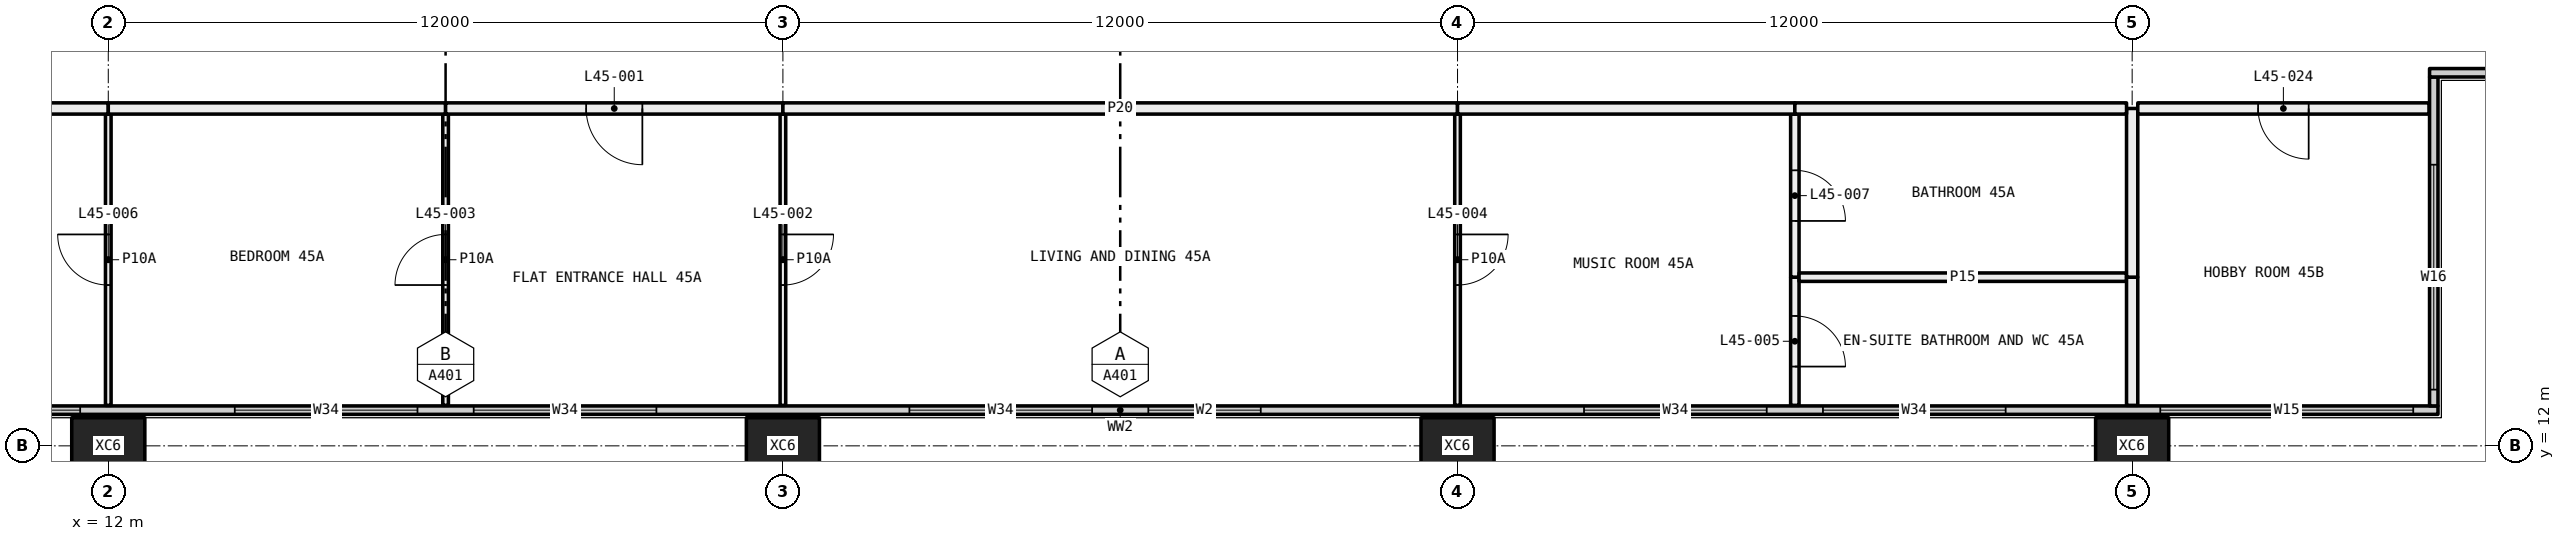
"""IFC4 building model, lengths in metres.
Left out: names, types, materials, properties, quantities, classifications, styles, units other than length and angle.
Written with IfcOpenShell. Run it as: python <this file> out.ifc"""

import sys

from ifc_helpers import new_model, si_unit, direction, frame, frame_2d, origin, origin_2d, place, context, subcontext, project, spatial, rectangle, hollow_rectangle, extrude, element, fill, save


model = new_model("IFC4")
c1 = context("Model", 3, precision=1e-05, world=origin(), true_north=direction((0.0, 1.0)))
c2 = subcontext(c1, "Body", "Model", "MODEL_VIEW")
j1 = project(units=[si_unit("LENGTHUNIT", "METRE"), si_unit("PLANEANGLEUNIT", "RADIAN")], contexts=[c1])
p1 = place(None, origin())
s1 = spatial("IfcSite", under=j1, at=p1, CompositionType="ELEMENT")
p2 = place(p1, origin())
s2 = spatial("IfcBuilding", under=s1, at=p2, CompositionType="ELEMENT")
p3 = place(p2, frame((0.0, 0.0, 172.05)))
s3 = spatial("IfcBuildingStorey", under=s2, at=p3, CompositionType="ELEMENT", Elevation=172.05)
for number, where, z_axis, x_axis in (
    (1, (12.0, 12.0, -0.4), (0.0, 0.0, 1.0), (1.0, 0.0, 0.0)),
    (2, (24.0, 12.0, -0.4), (0.0, 0.0, 1.0), (1.0, 0.0, 0.0)),
    (3, (36.0, 12.0, -0.4), (0.0, 0.0, 1.0), (1.0, 0.0, 0.0)),
    (4, (48.0, 12.0, -0.4), (0.0, 0.0, 1.0), (1.0, 0.0, 0.0)),
):
    element("IfcColumn", number, at=place(p3, frame(where, z_axis=z_axis, x_axis=x_axis)), inside=s3, PredefinedType="COLUMN", context=c2, shape_type="SweptSolid", body=[
        extrude(hollow_rectangle(XDim=1.3, YDim=1.0, WallThickness=0.05, at=origin_2d()), origin(), (0.0, 0.0, 1.0), 3.45),
    ])
p4 = place(p3, frame((6.56, 12.635, 0.0), z_axis=(0.0, 0.0, 1.0), x_axis=(1.0, 0.0, 0.0)))
e5 = element("IfcWall", 5, at=p4, inside=s3, PredefinedType="ELEMENTEDWALL", context=c2, shape_type="SweptSolid", body=[
    extrude(rectangle(XDim=46.88, YDim=0.15, at=frame_2d((23.44, 0.0))), origin(), (0.0, 0.0, 1.0), 3.05),
])
p5 = place(p4, frame((0.44, 0.0, 0.45)))
e6 = element("IfcOpeningElement", 6, at=p5, cuts=e5, PredefinedType="OPENING", context=c2, shape_type="SweptSolid", body=[
    extrude(rectangle(XDim=4.5, YDim=2.55, at=frame_2d((2.25, 1.275))), frame((0.0, 0.085, 0.0), z_axis=(0.0, -1.0, 0.0), x_axis=(1.0, 0.0, 0.0)), (0.0, 0.0, 1.0), 0.17),
])
p6 = place(p4, frame((7.69, 0.0, 0.45)))
e7 = element("IfcOpeningElement", 7, at=p6, cuts=e5, PredefinedType="OPENING", context=c2, shape_type="SweptSolid", body=[
    extrude(rectangle(XDim=3.25, YDim=2.55, at=frame_2d((1.625, 1.275))), frame((0.0, 0.085, 0.0), z_axis=(0.0, -1.0, 0.0), x_axis=(1.0, 0.0, 0.0)), (0.0, 0.0, 1.0), 0.17),
])
p7 = place(p4, frame((11.94, 0.0, 0.45)))
e8 = element("IfcOpeningElement", 8, at=p7, cuts=e5, PredefinedType="OPENING", context=c2, shape_type="SweptSolid", body=[
    extrude(rectangle(XDim=3.25, YDim=2.55, at=frame_2d((1.625, 1.275))), frame((0.0, 0.085, 0.0), z_axis=(0.0, -1.0, 0.0), x_axis=(1.0, 0.0, 0.0)), (0.0, 0.0, 1.0), 0.17),
])
p8 = place(p4, frame((19.69, 0.0, 0.45)))
e9 = element("IfcOpeningElement", 9, at=p8, cuts=e5, PredefinedType="OPENING", context=c2, shape_type="SweptSolid", body=[
    extrude(rectangle(XDim=3.25, YDim=2.55, at=frame_2d((1.625, 1.275))), frame((0.0, 0.085, 0.0), z_axis=(0.0, -1.0, 0.0), x_axis=(1.0, 0.0, 0.0)), (0.0, 0.0, 1.0), 0.17),
])
p9 = place(p4, frame((23.94, 0.0, 0.45)))
e10 = element("IfcOpeningElement", 10, at=p9, cuts=e5, PredefinedType="OPENING", context=c2, shape_type="SweptSolid", body=[
    extrude(rectangle(XDim=2.0, YDim=2.55, at=frame_2d((1.0, 1.275))), frame((0.0, 0.085, 0.0), z_axis=(0.0, -1.0, 0.0), x_axis=(1.0, 0.0, 0.0)), (0.0, 0.0, 1.0), 0.17),
])
p10 = place(p4, frame((31.69, 0.0, 0.45)))
e11 = element("IfcOpeningElement", 11, at=p10, cuts=e5, PredefinedType="OPENING", context=c2, shape_type="SweptSolid", body=[
    extrude(rectangle(XDim=3.25, YDim=2.55, at=frame_2d((1.625, 1.275))), frame((0.0, 0.085, 0.0), z_axis=(0.0, -1.0, 0.0), x_axis=(1.0, 0.0, 0.0)), (0.0, 0.0, 1.0), 0.17),
])
p11 = place(p4, frame((35.94, 0.0, 0.45)))
e12 = element("IfcOpeningElement", 12, at=p11, cuts=e5, PredefinedType="OPENING", context=c2, shape_type="SweptSolid", body=[
    extrude(rectangle(XDim=3.25, YDim=2.55, at=frame_2d((1.625, 1.275))), frame((0.0, 0.085, 0.0), z_axis=(0.0, -1.0, 0.0), x_axis=(1.0, 0.0, 0.0)), (0.0, 0.0, 1.0), 0.17),
])
p12 = place(p4, frame((41.94, 0.0, 0.45)))
e13 = element("IfcOpeningElement", 13, at=p12, cuts=e5, PredefinedType="OPENING", context=c2, shape_type="SweptSolid", body=[
    extrude(rectangle(XDim=4.5, YDim=2.55, at=frame_2d((2.25, 1.275))), frame((0.0, 0.085, 0.0), z_axis=(0.0, -1.0, 0.0), x_axis=(1.0, 0.0, 0.0)), (0.0, 0.0, 1.0), 0.17),
])
p13 = place(p3, frame((53.365, 12.71, 0.0), z_axis=(0.0, 0.0, 1.0), x_axis=(0.0, 1.0, 0.0)))
e14 = element("IfcWall", 14, at=p13, inside=s3, PredefinedType="ELEMENTEDWALL", context=c2, shape_type="SweptSolid", body=[
    extrude(rectangle(XDim=5.85, YDim=0.15, at=frame_2d((2.925, 0.0))), origin(), (0.0, 0.0, 1.0), 3.05),
])
p14 = place(p13, frame((0.29, 0.0, 0.45)))
e15 = element("IfcOpeningElement", 15, at=p14, cuts=e14, PredefinedType="OPENING", context=c2, shape_type="SweptSolid", body=[
    extrude(rectangle(XDim=4.0, YDim=2.55, at=frame_2d((2.0, 1.275))), frame((0.0, 0.085, 0.0), z_axis=(0.0, -1.0, 0.0), x_axis=(1.0, 0.0, 0.0)), (0.0, 0.0, 1.0), 0.17),
])
p15 = place(p3, frame((53.29, 18.635, 0.0), z_axis=(0.0, 0.0, 1.0), x_axis=(1.0, 0.0, 0.0)))
e16 = element("IfcWall", 16, at=p15, inside=s3, PredefinedType="ELEMENTEDWALL", context=c2, shape_type="SweptSolid", body=[
    extrude(rectangle(XDim=6.15, YDim=0.15, at=frame_2d((3.075, 0.0))), origin(), (0.0, 0.0, 1.0), 3.05),
])
p16 = place(p15, frame((1.71, 0.0, 0.45)))
e17 = element("IfcOpeningElement", 17, at=p16, cuts=e16, PredefinedType="OPENING", context=c2, shape_type="SweptSolid", body=[
    extrude(rectangle(XDim=4.0, YDim=2.55, at=frame_2d((2.0, 1.275))), frame((0.0, 0.085, 0.0), z_axis=(0.0, -1.0, 0.0), x_axis=(1.0, 0.0, 0.0)), (0.0, 0.0, 1.0), 0.17),
])
p17 = place(p3, frame((12.0, 12.72, 0.0), z_axis=(0.0, 0.0, 1.0), x_axis=(0.0, 1.0, 0.0)))
e18 = element("IfcWall", 18, at=p17, inside=s3, PredefinedType="PARTITIONING", context=c2, shape_type="SweptSolid", body=[
    extrude(rectangle(XDim=5.18, YDim=0.1, at=frame_2d((2.59, 0.0))), origin(), (0.0, 0.0, 1.0), 3.05),
])
p18 = place(p17, frame((2.14, 0.0, 0.0)))
e19 = element("IfcOpeningElement", 19, at=p18, cuts=e18, PredefinedType="OPENING", context=c2, shape_type="SweptSolid", body=[
    extrude(rectangle(XDim=0.9, YDim=2.1, at=frame_2d((0.45, 1.05))), frame((0.0, 0.06, 0.0), z_axis=(0.0, -1.0, 0.0), x_axis=(1.0, 0.0, 0.0)), (0.0, 0.0, 1.0), 0.12),
])
p19 = place(p3, frame((12.0, 18.0, 0.0), z_axis=(0.0, 0.0, 1.0), x_axis=(-1.0, 0.0, 0.0)))
e20 = element("IfcWall", 20, at=p19, inside=s3, PredefinedType="PARTITIONING", context=c2, shape_type="SweptSolid", body=[
    extrude(rectangle(XDim=1.9, YDim=0.2, at=frame_2d((0.95, 0.0))), origin(), (0.0, 0.0, 1.0), 3.05),
])
p20 = place(p3, frame((18.0, 12.72, 0.0), z_axis=(0.0, 0.0, 1.0), x_axis=(0.0, 1.0, 0.0)))
e21 = element("IfcWall", 21, at=p20, inside=s3, PredefinedType="PARTITIONING", context=c2, shape_type="SweptSolid", body=[
    extrude(rectangle(XDim=5.18, YDim=0.1, at=frame_2d((2.59, 0.0))), origin(), (0.0, 0.0, 1.0), 3.05),
])
p21 = place(p20, frame((2.14, 0.0, 0.0)))
e22 = element("IfcOpeningElement", 22, at=p21, cuts=e21, PredefinedType="OPENING", context=c2, shape_type="SweptSolid", body=[
    extrude(rectangle(XDim=0.9, YDim=2.1, at=frame_2d((0.45, 1.05))), frame((0.0, 0.06, 0.0), z_axis=(0.0, -1.0, 0.0), x_axis=(1.0, 0.0, 0.0)), (0.0, 0.0, 1.0), 0.12),
])
p22 = place(p3, frame((18.0, 18.0, 0.0), z_axis=(0.0, 0.0, 1.0), x_axis=(-1.0, 0.0, 0.0)))
e23 = element("IfcWall", 23, at=p22, inside=s3, PredefinedType="PARTITIONING", context=c2, shape_type="SweptSolid", body=[
    extrude(rectangle(XDim=6.0, YDim=0.2, at=frame_2d((3.0, 0.0))), origin(), (0.0, 0.0, 1.0), 3.05),
])
p23 = place(p3, frame((24.0, 12.72, 0.0), z_axis=(0.0, 0.0, 1.0), x_axis=(0.0, 1.0, 0.0)))
e24 = element("IfcWall", 24, at=p23, inside=s3, PredefinedType="PARTITIONING", context=c2, shape_type="SweptSolid", body=[
    extrude(rectangle(XDim=5.18, YDim=0.1, at=frame_2d((2.59, 0.0))), origin(), (0.0, 0.0, 1.0), 3.05),
])
p24 = place(p23, frame((2.14, 0.0, 0.0)))
e25 = element("IfcOpeningElement", 25, at=p24, cuts=e24, PredefinedType="OPENING", context=c2, shape_type="SweptSolid", body=[
    extrude(rectangle(XDim=0.9, YDim=2.1, at=frame_2d((0.45, 1.05))), frame((0.0, 0.06, 0.0), z_axis=(0.0, -1.0, 0.0), x_axis=(1.0, 0.0, 0.0)), (0.0, 0.0, 1.0), 0.12),
])
p25 = place(p3, frame((24.0, 18.0, 0.0), z_axis=(0.0, 0.0, 1.0), x_axis=(-1.0, 0.0, 0.0)))
e26 = element("IfcWall", 26, at=p25, inside=s3, PredefinedType="PARTITIONING", context=c2, shape_type="SweptSolid", body=[
    extrude(rectangle(XDim=6.0, YDim=0.2, at=frame_2d((3.0, 0.0))), origin(), (0.0, 0.0, 1.0), 3.05),
])
p26 = place(p25, frame((2.5, 0.0, 0.0)))
e27 = element("IfcOpeningElement", 27, at=p26, cuts=e26, PredefinedType="OPENING", context=c2, shape_type="SweptSolid", body=[
    extrude(rectangle(XDim=1.0, YDim=2.1, at=frame_2d((0.5, 1.05))), frame((0.0, 0.11, 0.0), z_axis=(0.0, -1.0, 0.0), x_axis=(1.0, 0.0, 0.0)), (0.0, 0.0, 1.0), 0.22),
])
p27 = place(p3, frame((36.0, 12.72, 0.0), z_axis=(0.0, 0.0, 1.0), x_axis=(0.0, 1.0, 0.0)))
e28 = element("IfcWall", 28, at=p27, inside=s3, PredefinedType="PARTITIONING", context=c2, shape_type="SweptSolid", body=[
    extrude(rectangle(XDim=5.18, YDim=0.1, at=frame_2d((2.59, 0.0))), origin(), (0.0, 0.0, 1.0), 2.45),
])
p28 = place(p27, frame((2.14, 0.0, 0.0)))
e29 = element("IfcOpeningElement", 29, at=p28, cuts=e28, PredefinedType="OPENING", context=c2, shape_type="SweptSolid", body=[
    extrude(rectangle(XDim=0.9, YDim=2.1, at=frame_2d((0.45, 1.05))), frame((0.0, 0.06, 0.0), z_axis=(0.0, -1.0, 0.0), x_axis=(1.0, 0.0, 0.0)), (0.0, 0.0, 1.0), 0.12),
])
p29 = place(p3, frame((36.0, 18.0, 0.0), z_axis=(0.0, 0.0, 1.0), x_axis=(-1.0, 0.0, 0.0)))
e30 = element("IfcWall", 30, at=p29, inside=s3, PredefinedType="PARTITIONING", context=c2, shape_type="SweptSolid", body=[
    extrude(rectangle(XDim=12.0, YDim=0.2, at=frame_2d((6.0, 0.0))), origin(), (0.0, 0.0, 1.0), 2.45),
])
p30 = place(p3, frame((42.0, 12.72, 0.0), z_axis=(0.0, 0.0, 1.0), x_axis=(0.0, 1.0, 0.0)))
e31 = element("IfcWall", 31, at=p30, inside=s3, PredefinedType="PARTITIONING", context=c2, shape_type="SweptSolid", body=[
    extrude(rectangle(XDim=2.28, YDim=0.15, at=frame_2d((1.14, 0.0))), origin(), (0.0, 0.0, 1.0), 3.05),
])
p31 = place(p30, frame((0.69, 0.0, 0.0)))
e32 = element("IfcOpeningElement", 32, at=p31, cuts=e31, PredefinedType="OPENING", context=c2, shape_type="SweptSolid", body=[
    extrude(rectangle(XDim=0.9, YDim=2.1, at=frame_2d((0.45, 1.05))), frame((0.0, 0.085, 0.0), z_axis=(0.0, -1.0, 0.0), x_axis=(1.0, 0.0, 0.0)), (0.0, 0.0, 1.0), 0.17),
])
p32 = place(p3, frame((42.0, 15.0, 0.0), z_axis=(0.0, 0.0, 1.0), x_axis=(0.0, 1.0, 0.0)))
e33 = element("IfcWall", 33, at=p32, inside=s3, PredefinedType="PARTITIONING", context=c2, shape_type="SweptSolid", body=[
    extrude(rectangle(XDim=2.9, YDim=0.15, at=frame_2d((1.45, 0.0))), origin(), (0.0, 0.0, 1.0), 3.05),
])
p33 = place(p32, frame((1.0, 0.0, 0.0)))
e34 = element("IfcOpeningElement", 34, at=p33, cuts=e33, PredefinedType="OPENING", context=c2, shape_type="SweptSolid", body=[
    extrude(rectangle(XDim=0.9, YDim=2.1, at=frame_2d((0.45, 1.05))), frame((0.0, 0.085, 0.0), z_axis=(0.0, -1.0, 0.0), x_axis=(1.0, 0.0, 0.0)), (0.0, 0.0, 1.0), 0.17),
])
p34 = place(p3, frame((42.0, 18.0, 0.0), z_axis=(0.0, 0.0, 1.0), x_axis=(-1.0, 0.0, 0.0)))
e35 = element("IfcWall", 35, at=p34, inside=s3, PredefinedType="PARTITIONING", context=c2, shape_type="SweptSolid", body=[
    extrude(rectangle(XDim=6.0, YDim=0.2, at=frame_2d((3.0, 0.0))), origin(), (0.0, 0.0, 1.0), 2.45),
])
p35 = place(p3, frame((47.9, 15.0, 0.0), z_axis=(0.0, 0.0, 1.0), x_axis=(-1.0, 0.0, 0.0)))
e36 = element("IfcWall", 36, at=p35, inside=s3, PredefinedType="PARTITIONING", context=c2, shape_type="SweptSolid", body=[
    extrude(rectangle(XDim=5.825, YDim=0.15, at=frame_2d((2.913, 0.0))), origin(), (0.0, 0.0, 1.0), 3.05),
])
p36 = place(p3, frame((48.0, 12.72, 0.0), z_axis=(0.0, 0.0, 1.0), x_axis=(0.0, 1.0, 0.0)))
e37 = element("IfcWall", 37, at=p36, inside=s3, PredefinedType="PARTITIONING", context=c2, shape_type="SweptSolid", body=[
    extrude(rectangle(XDim=2.28, YDim=0.2, at=frame_2d((1.14, 0.0))), origin(), (0.0, 0.0, 1.0), 3.05),
])
p37 = place(p3, frame((48.0, 15.0, 0.0), z_axis=(0.0, 0.0, 1.0), x_axis=(0.0, 1.0, 0.0)))
e38 = element("IfcWall", 38, at=p37, inside=s3, PredefinedType="PARTITIONING", context=c2, shape_type="SweptSolid", body=[
    extrude(rectangle(XDim=3.0, YDim=0.2, at=frame_2d((1.5, 0.0))), origin(), (0.0, 0.0, 1.0), 3.05),
])
p38 = place(p3, frame((47.9, 18.0, 0.0), z_axis=(0.0, 0.0, 1.0), x_axis=(-1.0, 0.0, 0.0)))
e39 = element("IfcWall", 39, at=p38, inside=s3, PredefinedType="PARTITIONING", context=c2, shape_type="SweptSolid", body=[
    extrude(rectangle(XDim=5.9, YDim=0.2, at=frame_2d((2.95, 0.0))), origin(), (0.0, 0.0, 1.0), 3.05),
])
p39 = place(p3, frame((53.28, 18.0, 0.0), z_axis=(0.0, 0.0, 1.0), x_axis=(-1.0, 0.0, 0.0)))
e40 = element("IfcWall", 40, at=p39, inside=s3, PredefinedType="PARTITIONING", context=c2, shape_type="SweptSolid", body=[
    extrude(rectangle(XDim=5.18, YDim=0.2, at=frame_2d((2.59, 0.0))), origin(), (0.0, 0.0, 1.0), 3.05),
])
p40 = place(p39, frame((2.14, 0.0, 0.0)))
e41 = element("IfcOpeningElement", 41, at=p40, cuts=e40, PredefinedType="OPENING", context=c2, shape_type="SweptSolid", body=[
    extrude(rectangle(XDim=0.9, YDim=2.1, at=frame_2d((0.45, 1.05))), frame((0.0, 0.11, 0.0), z_axis=(0.0, -1.0, 0.0), x_axis=(1.0, 0.0, 0.0)), (0.0, 0.0, 1.0), 0.22),
])
p41 = place(p5, origin())
e42 = element("IfcWindow", 42, at=p41, inside=s3, PartitioningType="SINGLE_PANEL", PredefinedType="WINDOW", context=c2, shape_type="SweptSolid", body=[
    extrude(rectangle(XDim=4.5, YDim=2.55, at=frame_2d((2.25, 1.275))), frame((0.0, 0.03, 0.0), z_axis=(0.0, -1.0, 0.0), x_axis=(1.0, 0.0, 0.0)), (0.0, 0.0, 1.0), 0.06),
])
fill(e6, e42)
p42 = place(p6, origin())
e43 = element("IfcWindow", 43, at=p42, inside=s3, PartitioningType="SINGLE_PANEL", PredefinedType="WINDOW", context=c2, shape_type="SweptSolid", body=[
    extrude(rectangle(XDim=3.25, YDim=2.55, at=frame_2d((1.625, 1.275))), frame((0.0, 0.03, 0.0), z_axis=(0.0, -1.0, 0.0), x_axis=(1.0, 0.0, 0.0)), (0.0, 0.0, 1.0), 0.06),
])
fill(e7, e43)
p43 = place(p7, origin())
e44 = element("IfcWindow", 44, at=p43, inside=s3, PartitioningType="SINGLE_PANEL", PredefinedType="WINDOW", context=c2, shape_type="SweptSolid", body=[
    extrude(rectangle(XDim=3.25, YDim=2.55, at=frame_2d((1.625, 1.275))), frame((0.0, 0.03, 0.0), z_axis=(0.0, -1.0, 0.0), x_axis=(1.0, 0.0, 0.0)), (0.0, 0.0, 1.0), 0.06),
])
fill(e8, e44)
p44 = place(p8, origin())
e45 = element("IfcWindow", 45, at=p44, inside=s3, PartitioningType="SINGLE_PANEL", PredefinedType="WINDOW", context=c2, shape_type="SweptSolid", body=[
    extrude(rectangle(XDim=3.25, YDim=2.55, at=frame_2d((1.625, 1.275))), frame((0.0, 0.03, 0.0), z_axis=(0.0, -1.0, 0.0), x_axis=(1.0, 0.0, 0.0)), (0.0, 0.0, 1.0), 0.06),
])
fill(e9, e45)
p45 = place(p9, origin())
e46 = element("IfcWindow", 46, at=p45, inside=s3, PartitioningType="SINGLE_PANEL", PredefinedType="WINDOW", context=c2, shape_type="SweptSolid", body=[
    extrude(rectangle(XDim=2.0, YDim=2.55, at=frame_2d((1.0, 1.275))), frame((0.0, 0.03, 0.0), z_axis=(0.0, -1.0, 0.0), x_axis=(1.0, 0.0, 0.0)), (0.0, 0.0, 1.0), 0.06),
])
fill(e10, e46)
p46 = place(p10, origin())
e47 = element("IfcWindow", 47, at=p46, inside=s3, PartitioningType="SINGLE_PANEL", PredefinedType="WINDOW", context=c2, shape_type="SweptSolid", body=[
    extrude(rectangle(XDim=3.25, YDim=2.55, at=frame_2d((1.625, 1.275))), frame((0.0, 0.03, 0.0), z_axis=(0.0, -1.0, 0.0), x_axis=(1.0, 0.0, 0.0)), (0.0, 0.0, 1.0), 0.06),
])
fill(e11, e47)
p47 = place(p11, origin())
e48 = element("IfcWindow", 48, at=p47, inside=s3, PartitioningType="SINGLE_PANEL", PredefinedType="WINDOW", context=c2, shape_type="SweptSolid", body=[
    extrude(rectangle(XDim=3.25, YDim=2.55, at=frame_2d((1.625, 1.275))), frame((0.0, 0.03, 0.0), z_axis=(0.0, -1.0, 0.0), x_axis=(1.0, 0.0, 0.0)), (0.0, 0.0, 1.0), 0.06),
])
fill(e12, e48)
p48 = place(p12, origin())
e49 = element("IfcWindow", 49, at=p48, inside=s3, PartitioningType="SINGLE_PANEL", PredefinedType="WINDOW", context=c2, shape_type="SweptSolid", body=[
    extrude(rectangle(XDim=4.5, YDim=2.55, at=frame_2d((2.25, 1.275))), frame((0.0, 0.03, 0.0), z_axis=(0.0, -1.0, 0.0), x_axis=(1.0, 0.0, 0.0)), (0.0, 0.0, 1.0), 0.06),
])
fill(e13, e49)
p49 = place(p14, origin())
e50 = element("IfcWindow", 50, at=p49, inside=s3, PartitioningType="SINGLE_PANEL", PredefinedType="WINDOW", context=c2, shape_type="SweptSolid", body=[
    extrude(rectangle(XDim=4.0, YDim=2.55, at=frame_2d((2.0, 1.275))), frame((0.0, 0.03, 0.0), z_axis=(0.0, -1.0, 0.0), x_axis=(1.0, 0.0, 0.0)), (0.0, 0.0, 1.0), 0.06),
])
fill(e15, e50)
p50 = place(p26, origin())
e51 = element("IfcDoor", 51, at=p50, inside=s3, OperationType="SINGLE_SWING_RIGHT", PredefinedType="DOOR", context=c2, shape_type="SweptSolid", body=[
    extrude(rectangle(XDim=1.0, YDim=2.1, at=frame_2d((0.5, 1.05))), frame((0.0, 0.025, 0.0), z_axis=(0.0, -1.0, 0.0), x_axis=(1.0, 0.0, 0.0)), (0.0, 0.0, 1.0), 0.05),
])
fill(e27, e51)
p51 = place(p24, frame((0.9, 0.0, 0.0), x_axis=(-1.0, 0.0, 0.0)))
e52 = element("IfcDoor", 52, at=p51, inside=s3, OperationType="SINGLE_SWING_RIGHT", PredefinedType="DOOR", context=c2, shape_type="SweptSolid", body=[
    extrude(rectangle(XDim=0.9, YDim=2.1, at=frame_2d((0.45, 1.05))), frame((0.0, 0.025, 0.0), z_axis=(0.0, -1.0, 0.0), x_axis=(1.0, 0.0, 0.0)), (0.0, 0.0, 1.0), 0.05),
])
fill(e25, e52)
p52 = place(p21, origin())
e53 = element("IfcDoor", 53, at=p52, inside=s3, OperationType="SINGLE_SWING_RIGHT", PredefinedType="DOOR", context=c2, shape_type="SweptSolid", body=[
    extrude(rectangle(XDim=0.9, YDim=2.1, at=frame_2d((0.45, 1.05))), frame((0.0, 0.025, 0.0), z_axis=(0.0, -1.0, 0.0), x_axis=(1.0, 0.0, 0.0)), (0.0, 0.0, 1.0), 0.05),
])
fill(e22, e53)
p53 = place(p28, frame((0.9, 0.0, 0.0), x_axis=(-1.0, 0.0, 0.0)))
e54 = element("IfcDoor", 54, at=p53, inside=s3, OperationType="SINGLE_SWING_RIGHT", PredefinedType="DOOR", context=c2, shape_type="SweptSolid", body=[
    extrude(rectangle(XDim=0.9, YDim=2.1, at=frame_2d((0.45, 1.05))), frame((0.0, 0.025, 0.0), z_axis=(0.0, -1.0, 0.0), x_axis=(1.0, 0.0, 0.0)), (0.0, 0.0, 1.0), 0.05),
])
fill(e29, e54)
p54 = place(p31, frame((0.9, 0.0, 0.0), x_axis=(-1.0, 0.0, 0.0)))
e55 = element("IfcDoor", 55, at=p54, inside=s3, OperationType="SINGLE_SWING_LEFT", PredefinedType="DOOR", context=c2, shape_type="SweptSolid", body=[
    extrude(rectangle(XDim=0.9, YDim=2.1, at=frame_2d((0.45, 1.05))), frame((0.0, 0.025, 0.0), z_axis=(0.0, -1.0, 0.0), x_axis=(1.0, 0.0, 0.0)), (0.0, 0.0, 1.0), 0.05),
])
fill(e32, e55)
p55 = place(p18, origin())
e56 = element("IfcDoor", 56, at=p55, inside=s3, OperationType="SINGLE_SWING_LEFT", PredefinedType="DOOR", context=c2, shape_type="SweptSolid", body=[
    extrude(rectangle(XDim=0.9, YDim=2.1, at=frame_2d((0.45, 1.05))), frame((0.0, 0.025, 0.0), z_axis=(0.0, -1.0, 0.0), x_axis=(1.0, 0.0, 0.0)), (0.0, 0.0, 1.0), 0.05),
])
fill(e19, e56)
p56 = place(p33, frame((0.9, 0.0, 0.0), x_axis=(-1.0, 0.0, 0.0)))
e57 = element("IfcDoor", 57, at=p56, inside=s3, OperationType="SINGLE_SWING_LEFT", PredefinedType="DOOR", context=c2, shape_type="SweptSolid", body=[
    extrude(rectangle(XDim=0.9, YDim=2.1, at=frame_2d((0.45, 1.05))), frame((0.0, 0.025, 0.0), z_axis=(0.0, -1.0, 0.0), x_axis=(1.0, 0.0, 0.0)), (0.0, 0.0, 1.0), 0.05),
])
fill(e34, e57)
p57 = place(p40, origin())
e58 = element("IfcDoor", 58, at=p57, inside=s3, OperationType="SINGLE_SWING_RIGHT", PredefinedType="DOOR", context=c2, shape_type="SweptSolid", body=[
    extrude(rectangle(XDim=0.9, YDim=2.1, at=frame_2d((0.45, 1.05))), frame((0.0, 0.025, 0.0), z_axis=(0.0, -1.0, 0.0), x_axis=(1.0, 0.0, 0.0)), (0.0, 0.0, 1.0), 0.05),
])
fill(e41, e58)
save(model, sys.argv[1])
